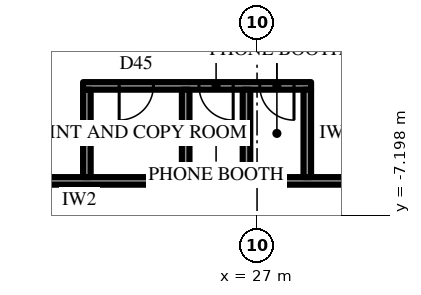
"""IFC4 building model, lengths in metres.
Left out: names, types, materials, properties, quantities, classifications, styles, units other than length and angle.
Written with IfcOpenShell. Run it as: python <this file> out.ifc"""

import sys

from ifc_helpers import new_model, si_unit, direction, frame, frame_2d, origin, place, context, subcontext, project, spatial, rectangle, extrude, element, fill, save


model = new_model("IFC4")
c1 = context("Model", 3, precision=1e-05, world=origin(), true_north=direction((0.0, 1.0)))
c2 = subcontext(c1, "Body", "Model", "MODEL_VIEW")
j1 = project(units=[si_unit("LENGTHUNIT", "METRE"), si_unit("PLANEANGLEUNIT", "RADIAN")], contexts=[c1])
p1 = place(None, origin())
s1 = spatial("IfcSite", under=j1, at=p1, CompositionType="ELEMENT")
p2 = place(p1, origin())
s2 = spatial("IfcBuilding", under=s1, at=p2, CompositionType="ELEMENT")
p3 = place(p2, frame((0.0, 0.0, 195.1)))
s3 = spatial("IfcBuildingStorey", under=s2, at=p3, CompositionType="ELEMENT", Elevation=195.1)
p4 = place(p3, frame((19.644, -28.675, 0.0), z_axis=(0.0, 0.0, 1.0), x_axis=(0.500003084452, 0.866023622968, 0.0)))
e1 = element("IfcWall", 1, at=p4, inside=s3, PredefinedType="SOLIDWALL", context=c2, shape_type="SweptSolid", body=[
    extrude(rectangle(XDim=30.022, YDim=0.3, at=frame_2d((15.011, 0.0))), origin(), (0.0, 0.0, 1.0), 2.75),
])
p5 = place(p4, frame((1.052, 0.0, 0.6)))
e2 = element("IfcOpeningElement", 2, at=p5, cuts=e1, PredefinedType="OPENING", context=c2, shape_type="SweptSolid", body=[
    extrude(rectangle(XDim=2.9, YDim=1.9, at=frame_2d((1.45, 0.95))), frame((0.0, 0.16, 0.0), z_axis=(0.0, -1.0, 0.0), x_axis=(1.0, 0.0, 0.0)), (0.0, 0.0, 1.0), 0.32),
])
p6 = place(p4, frame((6.056, 0.0, 0.6)))
e3 = element("IfcOpeningElement", 3, at=p6, cuts=e1, PredefinedType="OPENING", context=c2, shape_type="SweptSolid", body=[
    extrude(rectangle(XDim=2.9, YDim=1.9, at=frame_2d((1.45, 0.95))), frame((0.0, 0.16, 0.0), z_axis=(0.0, -1.0, 0.0), x_axis=(1.0, 0.0, 0.0)), (0.0, 0.0, 1.0), 0.32),
])
p7 = place(p4, frame((11.909, 0.0, 0.0)))
e4 = element("IfcOpeningElement", 4, at=p7, cuts=e1, PredefinedType="OPENING", context=c2, shape_type="SweptSolid", body=[
    extrude(rectangle(XDim=1.2, YDim=2.4, at=frame_2d((0.6, 1.2))), frame((0.0, 0.16, 0.0), z_axis=(0.0, -1.0, 0.0), x_axis=(1.0, 0.0, 0.0)), (0.0, 0.0, 1.0), 0.32),
])
p8 = place(p4, frame((16.063, 0.0, 0.6)))
e5 = element("IfcOpeningElement", 5, at=p8, cuts=e1, PredefinedType="OPENING", context=c2, shape_type="SweptSolid", body=[
    extrude(rectangle(XDim=2.9, YDim=1.9, at=frame_2d((1.45, 0.95))), frame((0.0, 0.16, 0.0), z_axis=(0.0, -1.0, 0.0), x_axis=(1.0, 0.0, 0.0)), (0.0, 0.0, 1.0), 0.32),
])
p9 = place(p4, frame((21.067, 0.0, 0.6)))
e6 = element("IfcOpeningElement", 6, at=p9, cuts=e1, PredefinedType="OPENING", context=c2, shape_type="SweptSolid", body=[
    extrude(rectangle(XDim=2.9, YDim=1.9, at=frame_2d((1.45, 0.95))), frame((0.0, 0.16, 0.0), z_axis=(0.0, -1.0, 0.0), x_axis=(1.0, 0.0, 0.0)), (0.0, 0.0, 1.0), 0.32),
])
p10 = place(p4, frame((26.07, 0.0, 0.6)))
e7 = element("IfcOpeningElement", 7, at=p10, cuts=e1, PredefinedType="OPENING", context=c2, shape_type="SweptSolid", body=[
    extrude(rectangle(XDim=2.9, YDim=1.9, at=frame_2d((1.45, 0.95))), frame((0.0, 0.16, 0.0), z_axis=(0.0, -1.0, 0.0), x_axis=(1.0, 0.0, 0.0)), (0.0, 0.0, 1.0), 0.32),
])
p11 = place(p3, frame((18.6, -6.3, 0.0), z_axis=(0.0, 0.0, 1.0), x_axis=(1.0, 0.0, 0.0)))
e8 = element("IfcWall", 8, at=p11, inside=s3, PredefinedType="PARTITIONING", context=c2, shape_type="SweptSolid", body=[
    extrude(rectangle(XDim=12.404, YDim=0.2, at=frame_2d((6.202, 0.0))), origin(), (0.0, 0.0, 1.0), 4.0),
])
p12 = place(p11, frame((0.74, 0.0, 0.0)))
e9 = element("IfcOpeningElement", 9, at=p12, cuts=e8, PredefinedType="OPENING", context=c2, shape_type="SweptSolid", body=[
    extrude(rectangle(XDim=1.0, YDim=2.2, at=frame_2d((0.5, 1.1))), frame((0.0, 0.11, 0.0), z_axis=(0.0, -1.0, 0.0), x_axis=(1.0, 0.0, 0.0)), (0.0, 0.0, 1.0), 0.22),
])
p13 = place(p3, frame((22.422, -3.8, 0.0), z_axis=(0.0, 0.0, 1.0), x_axis=(1.0, 0.0, 0.0)))
e10 = element("IfcWall", 10, at=p13, inside=s3, PredefinedType="PARTITIONING", context=c2, shape_type="SweptSolid", body=[
    extrude(rectangle(XDim=6.0, YDim=0.2, at=frame_2d((3.0, 0.0))), origin(), (0.0, 0.0, 1.0), 4.0),
])
p14 = place(p13, frame((0.95, 0.0, 0.0)))
e11 = element("IfcOpeningElement", 11, at=p14, cuts=e10, PredefinedType="OPENING", context=c2, shape_type="SweptSolid", body=[
    extrude(rectangle(XDim=0.9, YDim=2.2, at=frame_2d((0.45, 1.1))), frame((0.0, 0.11, 0.0), z_axis=(0.0, -1.0, 0.0), x_axis=(1.0, 0.0, 0.0)), (0.0, 0.0, 1.0), 0.22),
])
p15 = place(p13, frame((3.05, 0.0, 0.0)))
e12 = element("IfcOpeningElement", 12, at=p15, cuts=e10, PredefinedType="OPENING", context=c2, shape_type="SweptSolid", body=[
    extrude(rectangle(XDim=0.9, YDim=2.2, at=frame_2d((0.45, 1.1))), frame((0.0, 0.11, 0.0), z_axis=(0.0, -1.0, 0.0), x_axis=(1.0, 0.0, 0.0)), (0.0, 0.0, 1.0), 0.22),
])
p16 = place(p13, frame((4.65, 0.0, 0.0)))
e13 = element("IfcOpeningElement", 13, at=p16, cuts=e10, PredefinedType="OPENING", context=c2, shape_type="SweptSolid", body=[
    extrude(rectangle(XDim=0.9, YDim=2.2, at=frame_2d((0.45, 1.1))), frame((0.0, 0.11, 0.0), z_axis=(0.0, -1.0, 0.0), x_axis=(1.0, 0.0, 0.0)), (0.0, 0.0, 1.0), 0.22),
])
for number, where, z_axis, x_axis in (
    (14, (22.522, -6.2, 0.0), (0.0, 0.0, 1.0), (0.0, 1.0, 0.0)),
    (15, (25.122, -6.2, 0.0), (0.0, 0.0, 1.0), (0.0, 1.0, 0.0)),
    (16, (26.722, -6.2, 0.0), (0.0, 0.0, 1.0), (0.0, 1.0, 0.0)),
    (17, (28.322, -6.2, 0.0), (0.0, 0.0, 1.0), (0.0, 1.0, 0.0)),
):
    element("IfcWall", number, at=place(p3, frame(where, z_axis=z_axis, x_axis=x_axis)), inside=s3, PredefinedType="PARTITIONING", context=c2, shape_type="SweptSolid", body=[
        extrude(rectangle(XDim=2.3, YDim=0.2, at=frame_2d((1.15, 0.0))), origin(), (0.0, 0.0, 1.0), 4.0),
    ])
p17 = place(p14, frame((0.9, 0.0, 0.0), z_axis=(0.0, 0.0, 1.0), x_axis=(-1.0, 0.0, 0.0)))
e18 = element("IfcDoor", 18, at=p17, inside=s3, OperationType="SINGLE_SWING_LEFT", PredefinedType="DOOR", context=c2, shape_type="SweptSolid", body=[
    extrude(rectangle(XDim=0.9, YDim=2.2, at=frame_2d((0.45, 1.1))), frame((0.0, 0.025, 0.0), z_axis=(0.0, -1.0, 0.0), x_axis=(1.0, 0.0, 0.0)), (0.0, 0.0, 1.0), 0.05),
])
fill(e11, e18)
p18 = place(p15, frame((0.9, 0.0, 0.0), z_axis=(0.0, 0.0, 1.0), x_axis=(-1.0, 0.0, 0.0)))
e19 = element("IfcDoor", 19, at=p18, inside=s3, OperationType="SINGLE_SWING_RIGHT", PredefinedType="DOOR", context=c2, shape_type="SweptSolid", body=[
    extrude(rectangle(XDim=0.9, YDim=2.2, at=frame_2d((0.45, 1.1))), frame((0.0, 0.025, 0.0), z_axis=(0.0, -1.0, 0.0), x_axis=(1.0, 0.0, 0.0)), (0.0, 0.0, 1.0), 0.05),
])
fill(e12, e19)
p19 = place(p16, frame((0.9, 0.0, 0.0), z_axis=(0.0, 0.0, 1.0), x_axis=(-1.0, 0.0, 0.0)))
e20 = element("IfcDoor", 20, at=p19, inside=s3, OperationType="SINGLE_SWING_RIGHT", PredefinedType="DOOR", context=c2, shape_type="SweptSolid", body=[
    extrude(rectangle(XDim=0.9, YDim=2.2, at=frame_2d((0.45, 1.1))), frame((0.0, 0.025, 0.0), z_axis=(0.0, -1.0, 0.0), x_axis=(1.0, 0.0, 0.0)), (0.0, 0.0, 1.0), 0.05),
])
fill(e13, e20)
save(model, sys.argv[1])
